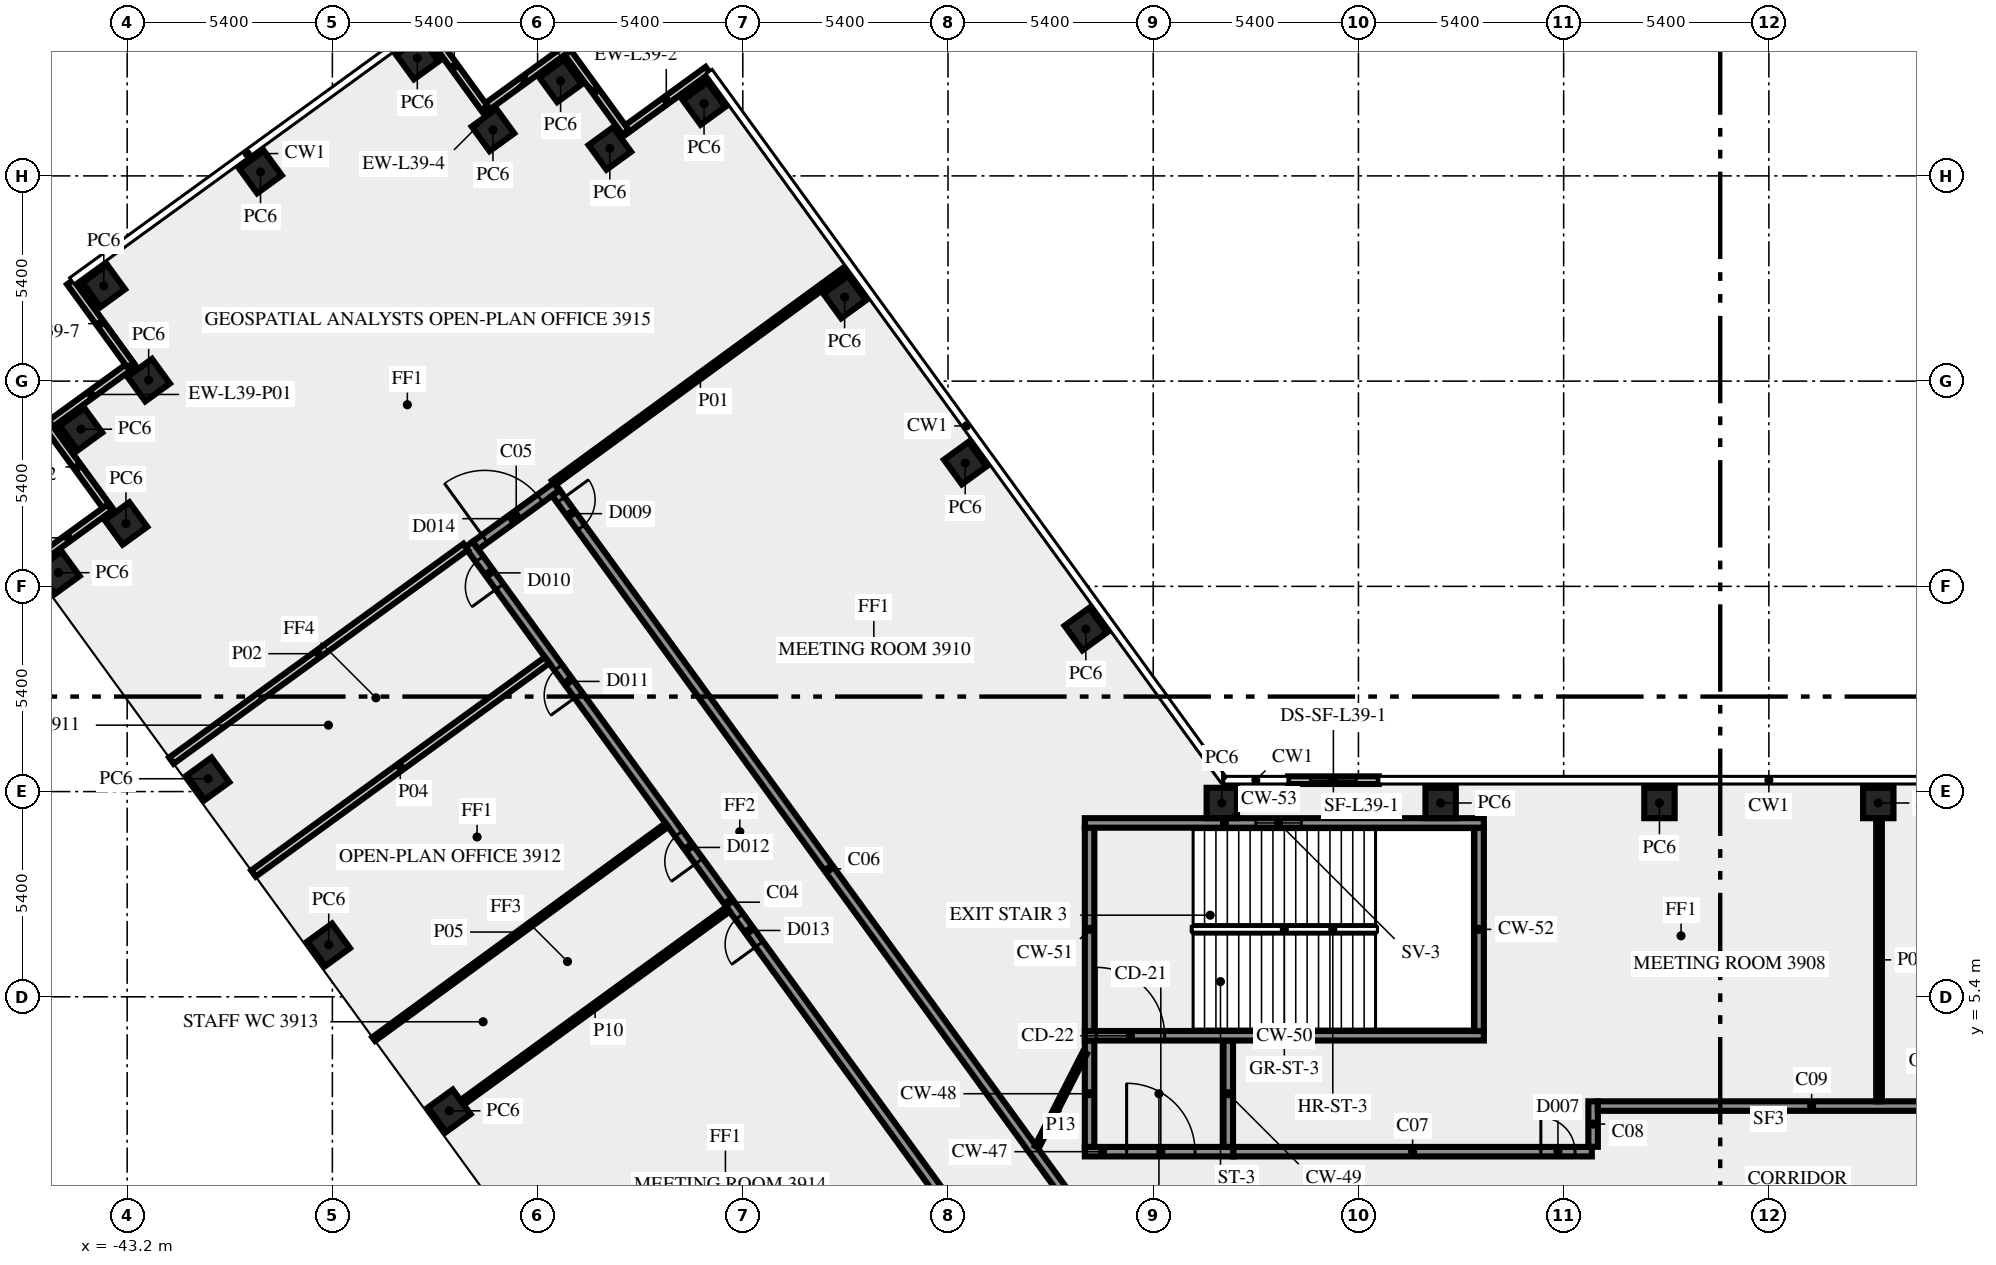
"""IFC4 building model, lengths in metres.
Left out: names, types, materials, properties, quantities, classifications, styles, units other than length and angle.
Written with IfcOpenShell. Run it as: python <this file> out.ifc"""

import sys

from ifc_helpers import new_model, si_unit, direction, frame, frame_2d, origin, origin_2d, place, context, subcontext, project, spatial, rectangle, extrude, element, fill, save


model = new_model("IFC4")
c1 = context("Model", 3, precision=1e-05, world=origin(), true_north=direction((0.0, 1.0)))
c2 = subcontext(c1, "Body", "Model", "MODEL_VIEW")
j1 = project(units=[si_unit("LENGTHUNIT", "METRE"), si_unit("PLANEANGLEUNIT", "RADIAN")], contexts=[c1])
p1 = place(None, origin())
s1 = spatial("IfcSite", under=j1, at=p1, CompositionType="ELEMENT")
p2 = place(p1, origin())
s2 = spatial("IfcBuilding", under=s1, at=p2, CompositionType="ELEMENT")
p3 = place(p2, frame((0.0, 0.0, 168.0)))
s3 = spatial("IfcBuildingStorey", under=s2, at=p3, CompositionType="ELEMENT", Elevation=168.0)
for number, where, z_axis, x_axis in (
    (1, (-17.974, 15.075, 0.0), (0.0, 0.0, 1.0), (-0.588, 0.809, 0.0)),
    (2, (-21.147, 19.444, 0.0), (0.0, 0.0, 1.0), (-0.588, 0.809, 0.0)),
    (3, (-24.321, 23.812, 0.0), (0.0, 0.0, 1.0), (-0.588, 0.809, 0.0)),
    (4, (-28.02, 28.905, 0.0), (0.0, 0.0, 1.0), (-0.809, -0.588, 0.0)),
    (5, (-30.499, 27.723, 0.0), (0.0, 0.0, 1.0), (-0.809, -0.588, 0.0)),
    (6, (-31.795, 29.5, 0.0), (0.0, 0.0, 1.0), (-0.588, 0.809, 0.0)),
    (7, (-33.574, 28.209, 0.0), (0.0, 0.0, 1.0), (-0.588, 0.809, 0.0)),
    (8, (-35.565, 30.1, 0.0), (0.0, 0.0, 1.0), (-0.809, -0.588, 0.0)),
    (9, (-39.691, 27.102, 0.0), (0.0, 0.0, 1.0), (-0.809, -0.588, 0.0)),
    (10, (-43.815, 24.105, 0.0), (0.0, 0.0, 1.0), (-0.809, -0.588, 0.0)),
    (11, (-42.635, 21.626, 0.0), (0.0, 0.0, 1.0), (-0.809, -0.588, 0.0)),
    (12, (-44.415, 20.335, 0.0), (0.0, 0.0, 1.0), (0.588, -0.809, 0.0)),
    (13, (-43.231, 17.854, 0.0), (0.0, 0.0, 1.0), (0.588, -0.809, 0.0)),
    (14, (-45.01, 16.56, 0.0), (0.0, 0.0, 1.0), (0.588, -0.809, 0.0)),
    (15, (-41.07, 11.137, 0.0), (0.0, 0.0, 1.0), (0.588, -0.809, 0.0)),
    (16, (-37.896, 6.769, 0.0), (0.0, 0.0, 1.0), (0.588, -0.809, 0.0)),
    (17, (-34.722, 2.4, 0.0), (0.0, 0.0, 1.0), (0.588, -0.809, 0.0)),
    (18, (2.879, 10.5, 0.0), (0.0, 0.0, 1.0), (-1.0, 0.0, 0.0)),
    (19, (-2.879, 10.5, 0.0), (0.0, 0.0, 1.0), (-1.0, 0.0, 0.0)),
    (20, (-8.637, 10.5, 0.0), (0.0, 0.0, 1.0), (-1.0, 0.0, 0.0)),
    (21, (-14.395, 10.5, 0.0), (0.0, 0.0, 1.0), (-1.0, 0.0, 0.0)),
):
    element("IfcColumn", number, at=place(p3, frame(where, z_axis=z_axis, x_axis=x_axis)), inside=s3, PredefinedType="COLUMN", context=c2, shape_type="SweptSolid", body=[
        extrude(rectangle(XDim=0.8, YDim=0.8, at=origin_2d()), origin(), (0.0, 0.0, 1.0), 3.65),
    ])
for number, where, z_axis, x_axis in (
    (22, (-43.061, 22.043, 0.0), (0.0, 0.0, 1.0), (-0.809, -0.588, 0.0)),
    (23, (-45.296, 20.434, 0.0), (0.0, 0.0, 1.0), (0.588, -0.809, 0.0)),
    (24, (-43.658, 18.272, 0.0), (0.0, 0.0, 1.0), (-0.809, -0.588, 0.0)),
    (25, (-27.921, 29.787, 0.0), (0.0, 0.0, 1.0), (-0.809, -0.588, 0.0)),
    (26, (-30.083, 28.149, 0.0), (0.0, 0.0, 1.0), (-0.588, 0.809, 0.0)),
    (27, (-31.654, 30.331, 0.0), (0.0, 0.0, 1.0), (-0.809, -0.588, 0.0)),
    (28, (-33.801, 28.786, 0.0), (0.0, 0.0, 1.0), (-0.588, 0.809, 0.0)),
    (29, (-44.699, 24.205, 0.0), (0.0, 0.0, 1.0), (0.588, -0.809, 0.0)),
):
    element("IfcWall", number, at=place(p3, frame(where, z_axis=z_axis, x_axis=x_axis)), inside=s3, PredefinedType="SOLIDWALL", context=c2, shape_type="SweptSolid", body=[
        extrude(rectangle(XDim=2.7, YDim=0.2, at=frame_2d((1.35, 0.0))), origin(), (0.0, 0.0, 1.0), 3.65),
    ])
p4 = place(p3, frame((-10.263, 11.1, 0.0), z_axis=(0.0, 0.0, 1.0), x_axis=(-1.0, 0.0, 0.0)))
e30 = element("IfcWall", 30, at=p4, inside=s3, PredefinedType="SOLIDWALL", context=c2, shape_type="SweptSolid", body=[
    extrude(rectangle(XDim=2.392, YDim=0.2, at=frame_2d((1.196, 0.0))), origin(), (0.0, 0.0, 1.0), 3.65),
])
p5 = place(p4, frame((0.596, 0.0, 1.0)))
e31 = element("IfcOpeningElement", 31, at=p5, cuts=e30, PredefinedType="OPENING", context=c2, shape_type="SweptSolid", body=[
    extrude(rectangle(XDim=1.2, YDim=1.2, at=frame_2d((0.6, 0.6))), frame((0.0, 0.11, 0.0), z_axis=(0.0, -1.0, 0.0), x_axis=(1.0, 0.0, 0.0)), (0.0, 0.0, 1.0), 0.22),
])
p6 = place(p3, frame((-18.0, 1.325, 0.0), z_axis=(0.0, 0.0, 1.0), x_axis=(1.0, 0.0, 0.0)))
e32 = element("IfcWall", 32, at=p6, inside=s3, PredefinedType="SHEAR", context=c2, shape_type="SweptSolid", body=[
    extrude(rectangle(XDim=3.9, YDim=0.25, at=frame_2d((1.95, 0.0))), origin(), (0.0, 0.0, 1.0), 3.65),
])
p7 = place(p6, frame((1.1, 0.0, 0.0)))
e33 = element("IfcOpeningElement", 33, at=p7, cuts=e32, PredefinedType="OPENING", context=c2, shape_type="SweptSolid", body=[
    extrude(rectangle(XDim=1.8, YDim=2.1, at=frame_2d((0.9, 1.05))), frame((0.0, 0.135, 0.0), z_axis=(0.0, -1.0, 0.0), x_axis=(1.0, 0.0, 0.0)), (0.0, 0.0, 1.0), 0.27),
])
for number, where, z_axis, x_axis in (
    (34, (-17.875, 1.45, 0.0), (0.0, 0.0, 1.0), (0.0, 1.0, 0.0)),
    (35, (-14.225, 1.45, 0.0), (0.0, 0.0, 1.0), (0.0, 1.0, 0.0)),
):
    element("IfcWall", number, at=place(p3, frame(where, z_axis=z_axis, x_axis=x_axis)), inside=s3, PredefinedType="SHEAR", context=c2, shape_type="SweptSolid", body=[
        extrude(rectangle(XDim=2.8, YDim=0.25, at=frame_2d((1.4, 0.0))), origin(), (0.0, 0.0, 1.0), 3.65),
    ])
p8 = place(p3, frame((-18.0, 4.375, 0.0), z_axis=(0.0, 0.0, 1.0), x_axis=(1.0, 0.0, 0.0)))
e36 = element("IfcWall", 36, at=p8, inside=s3, PredefinedType="SHEAR", context=c2, shape_type="SweptSolid", body=[
    extrude(rectangle(XDim=10.5, YDim=0.25, at=frame_2d((5.25, 0.0))), origin(), (0.0, 0.0, 1.0), 3.65),
])
p9 = place(p8, frame((0.3, 0.0, 0.0)))
e37 = element("IfcOpeningElement", 37, at=p9, cuts=e36, PredefinedType="OPENING", context=c2, shape_type="SweptSolid", body=[
    extrude(rectangle(XDim=1.8, YDim=2.1, at=frame_2d((0.9, 1.05))), frame((0.0, 0.135, 0.0), z_axis=(0.0, -1.0, 0.0), x_axis=(1.0, 0.0, 0.0)), (0.0, 0.0, 1.0), 0.27),
])
for number, where, z_axis, x_axis in (
    (38, (-17.875, 4.5, 0.0), (0.0, 0.0, 1.0), (0.0, 1.0, 0.0)),
    (39, (-7.625, 4.5, 0.0), (0.0, 0.0, 1.0), (0.0, 1.0, 0.0)),
):
    element("IfcWall", number, at=place(p3, frame(where, z_axis=z_axis, x_axis=x_axis)), inside=s3, PredefinedType="SHEAR", context=c2, shape_type="SweptSolid", body=[
        extrude(rectangle(XDim=5.35, YDim=0.25, at=frame_2d((2.675, 0.0))), origin(), (0.0, 0.0, 1.0), 3.65),
    ])
p10 = place(p3, frame((-18.0, 9.975, 0.0), z_axis=(0.0, 0.0, 1.0), x_axis=(1.0, 0.0, 0.0)))
e40 = element("IfcWall", 40, at=p10, inside=s3, PredefinedType="SHEAR", context=c2, shape_type="SweptSolid", body=[
    extrude(rectangle(XDim=10.5, YDim=0.25, at=frame_2d((5.25, 0.0))), origin(), (0.0, 0.0, 1.0), 3.65),
])
p11 = place(p10, frame((4.5, 0.0, 1.0)))
e41 = element("IfcOpeningElement", 41, at=p11, cuts=e40, PredefinedType="OPENING", context=c2, shape_type="SweptSolid", body=[
    extrude(rectangle(XDim=1.2, YDim=1.2, at=frame_2d((0.6, 0.6))), frame((0.0, 0.135, 0.0), z_axis=(0.0, -1.0, 0.0), x_axis=(1.0, 0.0, 0.0)), (0.0, 0.0, 1.0), 0.27),
])
p12 = place(p3, frame((-20.531, -1.523, 0.0), z_axis=(0.0, 0.0, 1.0), x_axis=(-0.587784239999, 0.809017729849, 0.0)))
e42 = element("IfcWall", 42, at=p12, inside=s3, PredefinedType="SOLIDWALL", context=c2, shape_type="SweptSolid", body=[
    extrude(rectangle(XDim=23.271, YDim=0.25, at=frame_2d((11.635, 0.0))), origin(), (0.0, 0.0, 1.0), 3.65),
])
p13 = place(p12, frame((18.366, 0.0, 0.0)))
e43 = element("IfcOpeningElement", 43, at=p13, cuts=e42, PredefinedType="OPENING", context=c2, shape_type="SweptSolid", body=[
    extrude(rectangle(XDim=0.9, YDim=2.1, at=frame_2d((0.45, 1.05))), frame((0.0, 0.135, 0.0), z_axis=(0.0, -1.0, 0.0), x_axis=(1.0, 0.0, 0.0)), (0.0, 0.0, 1.0), 0.27),
])
p14 = place(p12, frame((10.266, 0.0, 0.0)))
e44 = element("IfcOpeningElement", 44, at=p14, cuts=e42, PredefinedType="OPENING", context=c2, shape_type="SweptSolid", body=[
    extrude(rectangle(XDim=0.9, YDim=2.1, at=frame_2d((0.45, 1.05))), frame((0.0, 0.135, 0.0), z_axis=(0.0, -1.0, 0.0), x_axis=(1.0, 0.0, 0.0)), (0.0, 0.0, 1.0), 0.27),
])
p15 = place(p12, frame((21.896, 0.0, 0.0)))
e45 = element("IfcOpeningElement", 45, at=p15, cuts=e42, PredefinedType="OPENING", context=c2, shape_type="SweptSolid", body=[
    extrude(rectangle(XDim=0.9, YDim=2.1, at=frame_2d((0.45, 1.05))), frame((0.0, 0.135, 0.0), z_axis=(0.0, -1.0, 0.0), x_axis=(1.0, 0.0, 0.0)), (0.0, 0.0, 1.0), 0.27),
])
p16 = place(p12, frame((12.966, 0.0, 0.0)))
e46 = element("IfcOpeningElement", 46, at=p16, cuts=e42, PredefinedType="OPENING", context=c2, shape_type="SweptSolid", body=[
    extrude(rectangle(XDim=0.9, YDim=2.1, at=frame_2d((0.45, 1.05))), frame((0.0, 0.135, 0.0), z_axis=(0.0, -1.0, 0.0), x_axis=(1.0, 0.0, 0.0)), (0.0, 0.0, 1.0), 0.27),
])
p17 = place(p3, frame((-34.034, 17.275, 0.0), z_axis=(0.0, 0.0, 1.0), x_axis=(0.809006914995, 0.587799125119, 0.0)))
e47 = element("IfcWall", 47, at=p17, inside=s3, PredefinedType="SOLIDWALL", context=c2, shape_type="SweptSolid", body=[
    extrude(rectangle(XDim=2.65, YDim=0.25, at=frame_2d((1.325, 0.0))), origin(), (0.0, 0.0, 1.0), 3.65),
])
p18 = place(p17, frame((0.3, 0.0, 0.0)))
e48 = element("IfcOpeningElement", 48, at=p18, cuts=e47, PredefinedType="OPENING", context=c2, shape_type="SweptSolid", body=[
    extrude(rectangle(XDim=1.8, YDim=2.1, at=frame_2d((0.9, 1.05))), frame((0.0, 0.135, 0.0), z_axis=(0.0, -1.0, 0.0), x_axis=(1.0, 0.0, 0.0)), (0.0, 0.0, 1.0), 0.27),
])
p19 = place(p3, frame((-31.918, 18.658, 0.0), z_axis=(0.0, 0.0, 1.0), x_axis=(0.587788731405, -0.80901446664, 0.0)))
e49 = element("IfcWall", 49, at=p19, inside=s3, PredefinedType="SOLIDWALL", context=c2, shape_type="SweptSolid", body=[
    extrude(rectangle(XDim=24.453, YDim=0.25, at=frame_2d((12.227, 0.0))), origin(), (0.0, 0.0, 1.0), 3.65),
])
p20 = place(p19, frame((0.224, 0.0, 0.0)))
e50 = element("IfcOpeningElement", 50, at=p20, cuts=e49, PredefinedType="OPENING", context=c2, shape_type="SweptSolid", body=[
    extrude(rectangle(XDim=0.9, YDim=2.1, at=frame_2d((0.45, 1.05))), frame((0.0, 0.135, 0.0), z_axis=(0.0, -1.0, 0.0), x_axis=(1.0, 0.0, 0.0)), (0.0, 0.0, 1.0), 0.27),
])
p21 = place(p3, frame((-14.09, 1.325, 0.0), z_axis=(0.0, 0.0, 1.0), x_axis=(1.0, 0.0, 0.0)))
e51 = element("IfcWall", 51, at=p21, inside=s3, PredefinedType="SOLIDWALL", context=c2, shape_type="SweptSolid", body=[
    extrude(rectangle(XDim=9.431, YDim=0.25, at=frame_2d((4.716, 0.0))), origin(), (0.0, 0.0, 1.0), 3.65),
])
p22 = place(p21, frame((8.09, 0.0, 0.0)))
e52 = element("IfcOpeningElement", 52, at=p22, cuts=e51, PredefinedType="OPENING", context=c2, shape_type="SweptSolid", body=[
    extrude(rectangle(XDim=0.9, YDim=2.1, at=frame_2d((0.45, 1.05))), frame((0.0, 0.135, 0.0), z_axis=(0.0, -1.0, 0.0), x_axis=(1.0, 0.0, 0.0)), (0.0, 0.0, 1.0), 0.27),
])
p23 = place(p3, frame((-4.625, 1.454, 0.0), z_axis=(0.0, 0.0, 1.0), x_axis=(0.0, 1.0, 0.0)))
e53 = element("IfcWall", 53, at=p23, inside=s3, PredefinedType="SOLIDWALL", context=c2, shape_type="SweptSolid", body=[
    extrude(rectangle(XDim=1.196, YDim=0.25, at=frame_2d((0.598, 0.0))), origin(), (0.0, 0.0, 1.0), 3.65),
])
p24 = place(p3, frame((-4.5, 2.525, 0.0), z_axis=(0.0, 0.0, 1.0), x_axis=(1.0, 0.0, 0.0)))
e54 = element("IfcWall", 54, at=p24, inside=s3, PredefinedType="SOLIDWALL", context=c2, shape_type="SweptSolid", body=[
    extrude(rectangle(XDim=11.25, YDim=0.25, at=frame_2d((5.625, 0.0))), origin(), (0.0, 0.0, 1.0), 3.65),
])
p25 = place(p3, frame((-31.98, 18.922, 0.0), z_axis=(0.0, 0.0, 1.0), x_axis=(0.807588329082, 0.589746632657, 0.0)))
e55 = element("IfcWall", 55, at=p25, inside=s3, PredefinedType="PARTITIONING", context=c2, shape_type="SweptSolid", body=[
    extrude(rectangle(XDim=9.57, YDim=0.15, at=frame_2d((4.785, 0.0))), origin(), (0.0, 0.0, 1.0), 2.85),
])
p26 = place(p3, frame((-42.036, 11.615, 0.0), z_axis=(0.0, 0.0, 1.0), x_axis=(0.808985331811, 0.587828829605, 0.0)))
e56 = element("IfcWall", 56, at=p26, inside=s3, PredefinedType="SOLIDWALL", context=c2, shape_type="SweptSolid", body=[
    extrude(rectangle(XDim=9.57, YDim=0.2, at=frame_2d((4.785, 0.0))), origin(), (0.0, 0.0, 1.0), 2.85),
])
p27 = place(p3, frame((2.899, 10.095, 0.0), z_axis=(0.0, 0.0, 1.0), x_axis=(0.0, -1.0, 0.0)))
e57 = element("IfcWall", 57, at=p27, inside=s3, PredefinedType="PARTITIONING", context=c2, shape_type="SweptSolid", body=[
    extrude(rectangle(XDim=7.445, YDim=0.15, at=frame_2d((3.723, 0.0))), origin(), (0.0, 0.0, 1.0), 3.65),
])
p28 = place(p3, frame((-32.15, 14.256, 0.0), z_axis=(0.0, 0.0, 1.0), x_axis=(-0.809064299351, -0.587720137068, 0.0)))
e58 = element("IfcWall", 58, at=p28, inside=s3, PredefinedType="SOLIDWALL", context=c2, shape_type="SweptSolid", body=[
    extrude(rectangle(XDim=9.55, YDim=0.2, at=frame_2d((4.775, 0.0))), origin(), (0.0, 0.0, 1.0), 2.85),
])
p29 = place(p3, frame((-36.712, 4.288, 0.0), z_axis=(0.0, 0.0, 1.0), x_axis=(0.807606997933, 0.589721067023, 0.0)))
e59 = element("IfcWall", 59, at=p29, inside=s3, PredefinedType="PARTITIONING", context=c2, shape_type="SweptSolid", body=[
    extrude(rectangle(XDim=9.55, YDim=0.12, at=frame_2d((4.775, 0.0))), origin(), (0.0, 0.0, 1.0), 2.85),
])
p30 = place(p3, frame((-27.389, 7.703, 0.0), z_axis=(0.0, 0.0, 1.0), x_axis=(-0.809060825193, -0.587724919617, 0.0)))
e60 = element("IfcWall", 60, at=p30, inside=s3, PredefinedType="PARTITIONING", context=c2, shape_type="SweptSolid", body=[
    extrude(rectangle(XDim=8.645, YDim=0.15, at=frame_2d((4.322, 0.0))), origin(), (0.0, 0.0, 1.0), 3.65),
])
p31 = place(p3, frame((-19.261, 1.45, 0.0), z_axis=(0.0, 0.0, 1.0), x_axis=(0.453950796792, 0.891026752736, 0.0)))
e61 = element("IfcWall", 61, at=p31, inside=s3, PredefinedType="PARTITIONING", context=c2, shape_type="SweptSolid", body=[
    extrude(rectangle(XDim=2.778, YDim=0.12, at=frame_2d((1.389, 0.0))), origin(), (0.0, 0.0, 1.0), 3.65),
])
p32 = place(p5, origin())
e62 = element("IfcWindow", 62, at=p32, inside=s3, PartitioningType="SINGLE_PANEL", PredefinedType="WINDOW", context=c2, shape_type="SweptSolid", body=[
    extrude(rectangle(XDim=1.2, YDim=1.2, at=frame_2d((0.6, 0.6))), frame((0.0, 0.03, 0.0), z_axis=(0.0, -1.0, 0.0), x_axis=(1.0, 0.0, 0.0)), (0.0, 0.0, 1.0), 0.06),
])
fill(e31, e62)
p33 = place(p7, origin())
e63 = element("IfcDoor", 63, at=p33, inside=s3, OperationType="DOUBLE_DOOR_SINGLE_SWING", PredefinedType="DOOR", context=c2, shape_type="SweptSolid", body=[
    extrude(rectangle(XDim=1.8, YDim=2.1, at=frame_2d((0.9, 1.05))), frame((0.0, 0.025, 0.0), z_axis=(0.0, -1.0, 0.0), x_axis=(1.0, 0.0, 0.0)), (0.0, 0.0, 1.0), 0.05),
])
fill(e33, e63)
p34 = place(p9, origin())
e64 = element("IfcDoor", 64, at=p34, inside=s3, OperationType="DOUBLE_DOOR_SINGLE_SWING", PredefinedType="DOOR", context=c2, shape_type="SweptSolid", body=[
    extrude(rectangle(XDim=1.8, YDim=2.1, at=frame_2d((0.9, 1.05))), frame((0.0, 0.025, 0.0), z_axis=(0.0, -1.0, 0.0), x_axis=(1.0, 0.0, 0.0)), (0.0, 0.0, 1.0), 0.05),
])
fill(e37, e64)
p35 = place(p11, origin())
e65 = element("IfcWindow", 65, at=p35, inside=s3, PartitioningType="SINGLE_PANEL", PredefinedType="WINDOW", context=c2, shape_type="SweptSolid", body=[
    extrude(rectangle(XDim=1.2, YDim=1.2, at=frame_2d((0.6, 0.6))), frame((0.0, 0.03, 0.0), z_axis=(0.0, -1.0, 0.0), x_axis=(1.0, 0.0, 0.0)), (0.0, 0.0, 1.0), 0.06),
])
fill(e41, e65)
p36 = place(p18, origin())
e66 = element("IfcDoor", 66, at=p36, inside=s3, OperationType="DOUBLE_DOOR_SINGLE_SWING", PredefinedType="DOOR", context=c2, shape_type="SweptSolid", body=[
    extrude(rectangle(XDim=1.8, YDim=2.1, at=frame_2d((0.9, 1.05))), frame((0.0, 0.025, 0.0), z_axis=(0.0, -1.0, 0.0), x_axis=(1.0, 0.0, 0.0)), (0.0, 0.0, 1.0), 0.05),
])
fill(e48, e66)
p37 = place(p13, origin())
e67 = element("IfcDoor", 67, at=p37, inside=s3, OperationType="SINGLE_SWING_RIGHT", PredefinedType="DOOR", context=c2, shape_type="SweptSolid", body=[
    extrude(rectangle(XDim=0.9, YDim=2.1, at=frame_2d((0.45, 1.05))), frame((0.0, 0.025, 0.0), z_axis=(0.0, -1.0, 0.0), x_axis=(1.0, 0.0, 0.0)), (0.0, 0.0, 1.0), 0.05),
])
fill(e43, e67)
p38 = place(p22, origin())
e68 = element("IfcDoor", 68, at=p38, inside=s3, OperationType="SINGLE_SWING_RIGHT", PredefinedType="DOOR", context=c2, shape_type="SweptSolid", body=[
    extrude(rectangle(XDim=0.9, YDim=2.1, at=frame_2d((0.45, 1.05))), frame((0.0, 0.025, 0.0), z_axis=(0.0, -1.0, 0.0), x_axis=(1.0, 0.0, 0.0)), (0.0, 0.0, 1.0), 0.05),
])
fill(e52, e68)
p39 = place(p20, origin())
e69 = element("IfcDoor", 69, at=p39, inside=s3, OperationType="SINGLE_SWING_LEFT", PredefinedType="DOOR", context=c2, shape_type="SweptSolid", body=[
    extrude(rectangle(XDim=0.9, YDim=2.1, at=frame_2d((0.45, 1.05))), frame((0.0, 0.025, 0.0), z_axis=(0.0, -1.0, 0.0), x_axis=(1.0, 0.0, 0.0)), (0.0, 0.0, 1.0), 0.05),
])
fill(e50, e69)
p40 = place(p14, origin())
e70 = element("IfcDoor", 70, at=p40, inside=s3, OperationType="SINGLE_SWING_RIGHT", PredefinedType="DOOR", context=c2, shape_type="SweptSolid", body=[
    extrude(rectangle(XDim=0.9, YDim=2.1, at=frame_2d((0.45, 1.05))), frame((0.0, 0.025, 0.0), z_axis=(0.0, -1.0, 0.0), x_axis=(1.0, 0.0, 0.0)), (0.0, 0.0, 1.0), 0.05),
])
fill(e44, e70)
p41 = place(p15, origin())
e71 = element("IfcDoor", 71, at=p41, inside=s3, OperationType="SINGLE_SWING_RIGHT", PredefinedType="DOOR", context=c2, shape_type="SweptSolid", body=[
    extrude(rectangle(XDim=0.9, YDim=2.1, at=frame_2d((0.45, 1.05))), frame((0.0, 0.025, 0.0), z_axis=(0.0, -1.0, 0.0), x_axis=(1.0, 0.0, 0.0)), (0.0, 0.0, 1.0), 0.05),
])
fill(e45, e71)
p42 = place(p16, origin())
e72 = element("IfcDoor", 72, at=p42, inside=s3, OperationType="SINGLE_SWING_RIGHT", PredefinedType="DOOR", context=c2, shape_type="SweptSolid", body=[
    extrude(rectangle(XDim=0.9, YDim=2.1, at=frame_2d((0.45, 1.05))), frame((0.0, 0.025, 0.0), z_axis=(0.0, -1.0, 0.0), x_axis=(1.0, 0.0, 0.0)), (0.0, 0.0, 1.0), 0.05),
])
fill(e46, e72)
save(model, sys.argv[1])
